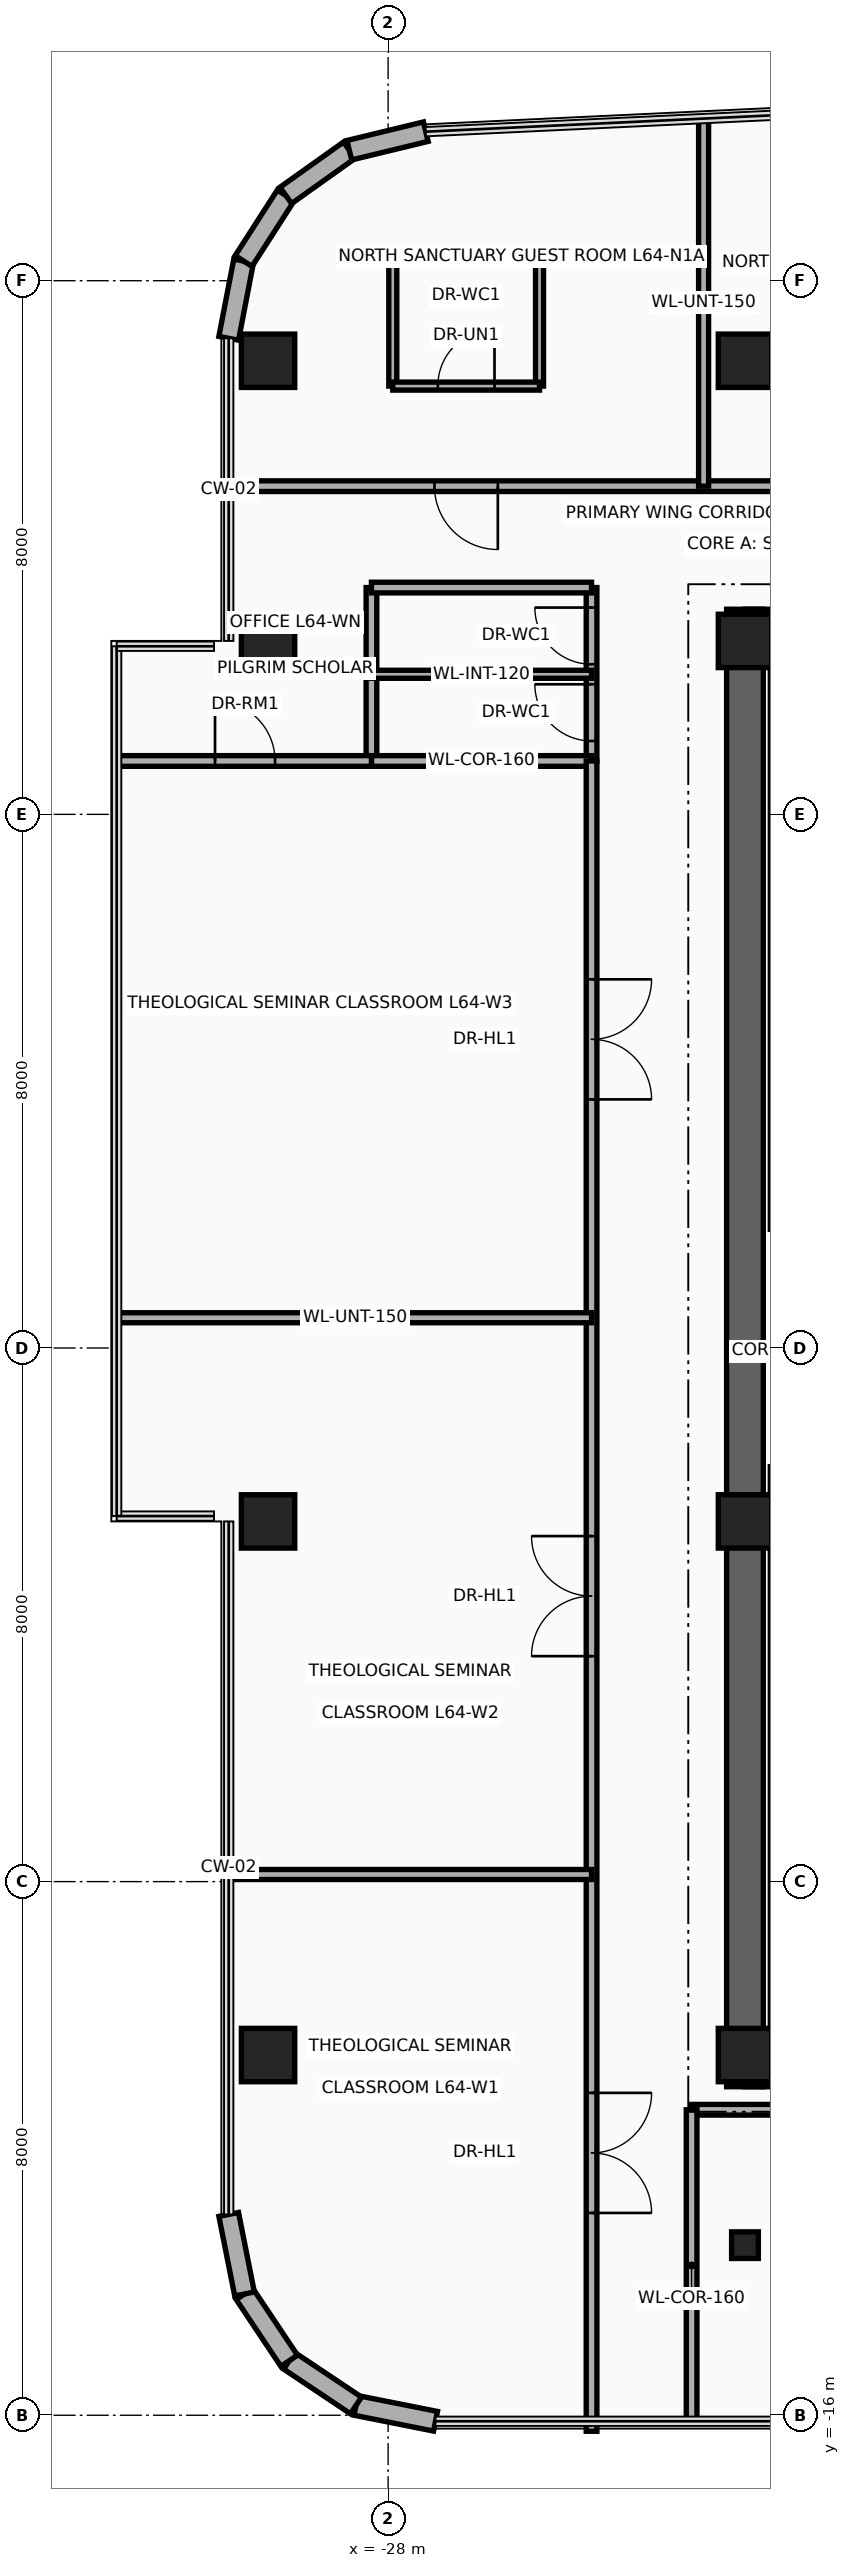
"""IFC4 building model, lengths in metres.
Left out: names, types, materials, properties, quantities, classifications, styles, units other than length and angle.
Written with IfcOpenShell. Run it as: python <this file> out.ifc"""

import sys

from ifc_helpers import new_model, si_unit, direction, frame, frame_2d, origin, origin_2d, place, context, subcontext, project, spatial, rectangle, i_section, extrude, source, transform, mapped, element, fill, save


model = new_model("IFC4")
c1 = context("Model", 3, precision=1e-05, world=origin(), true_north=direction((0.0, 1.0)))
c2 = subcontext(c1, "Body", "Model", "MODEL_VIEW")
j1 = project(units=[si_unit("LENGTHUNIT", "METRE"), si_unit("PLANEANGLEUNIT", "RADIAN")], contexts=[c1])
p1 = place(None, origin())
s1 = spatial("IfcSite", under=j1, at=p1, CompositionType="ELEMENT")
p2 = place(p1, origin())
s2 = spatial("IfcBuilding", under=s1, at=p2, CompositionType="ELEMENT")
p3 = place(p2, frame((0.0, 0.0, 247.5)))
s3 = spatial("IfcBuildingStorey", under=s2, at=p3, CompositionType="ELEMENT", Elevation=247.5)
p4 = place(p3, frame((-22.65, -11.075, 0.0), z_axis=(0.0, 0.0, 1.0), x_axis=(0.0, 1.0, 0.0)))
e1 = element("IfcWall", 1, at=p4, inside=s3, PredefinedType="SHEAR", context=c2, shape_type="SweptSolid", body=[
    extrude(rectangle(XDim=22.15, YDim=0.55, at=frame_2d((11.075, 0.0))), origin(), (0.0, 0.0, 1.0), 3.26),
])
for number, where, z_axis, x_axis in (
    (2, (-22.65, 10.8, 0.0), (0.0, 0.0, 1.0), (1.0, 0.0, 0.0)),
    (3, (-22.65, -10.8, 0.0), (0.0, 0.0, 1.0), (1.0, 0.0, 0.0)),
):
    element("IfcWall", number, at=place(p3, frame(where, z_axis=z_axis, x_axis=x_axis)), inside=s3, PredefinedType="SHEAR", context=c2, shape_type="SweptSolid", body=[
        extrude(rectangle(XDim=10.25, YDim=0.55, at=frame_2d((5.125, 0.0))), origin(), (0.0, 0.0, 1.0), 3.26),
    ])
m1 = source(origin(), c2, "Body", "SweptSolid", [
    extrude(rectangle(XDim=0.8, YDim=0.8, at=origin_2d()), origin(), (0.0, 0.0, 1.0), 3.5),
])
for number, where, z_axis, x_axis in (
    (4, (-29.8, -10.6, 0.0), (0.0, 0.0, 1.0), (1.0, 0.0, 0.0)),
    (5, (-22.65, -10.6, 0.0), (0.0, 0.0, 1.0), (1.0, 0.0, 0.0)),
    (6, (-29.8, -2.6, 0.0), (0.0, 0.0, 1.0), (1.0, 0.0, 0.0)),
    (7, (-22.65, -2.6, 0.0), (0.0, 0.0, 1.0), (1.0, 0.0, 0.0)),
    (8, (-29.8, 10.6, 0.0), (0.0, 0.0, 1.0), (1.0, 0.0, 0.0)),
    (9, (-22.65, 10.6, 0.0), (0.0, 0.0, 1.0), (1.0, 0.0, 0.0)),
    (10, (-29.8, 14.8, 0.0), (0.0, 0.0, 1.0), (1.0, 0.0, 0.0)),
    (11, (-22.65, 14.8, 0.0), (0.0, 0.0, 1.0), (1.0, 0.0, 0.0)),
):
    element("IfcColumn", number, at=place(p3, frame(where, z_axis=z_axis, x_axis=x_axis)), inside=s3, PredefinedType="COLUMN", context=c2, shape_type="MappedRepresentation", body=[
        mapped(m1, transform((0.0, 0.0, 0.0), x_axis=(1.0, 0.0, 0.0), y_axis=(0.0, 1.0, 0.0), z_axis=(0.0, 0.0, 1.0), scale=1.0)),
    ])
m2 = source(origin(), c2, "Body", "SweptSolid", [
    extrude(i_section(OverallWidth=0.401, OverallDepth=0.399, WebThickness=0.025, FlangeThickness=0.04, at=origin_2d()), origin(), (0.0, 0.0, 1.0), 3.5),
])
p5 = place(p3, frame((-22.65, -13.45, 0.0), z_axis=(0.0, 0.0, 1.0), x_axis=(1.0, 0.0, 0.0)))
e12 = element("IfcColumn", 12, at=p5, inside=s3, PredefinedType="COLUMN", context=c2, shape_type="MappedRepresentation", body=[
    mapped(m2, transform((0.0, 0.0, 0.0), x_axis=(1.0, 0.0, 0.0), y_axis=(0.0, 1.0, 0.0), z_axis=(0.0, 0.0, 1.0), scale=1.0)),
])
p6 = place(p3, frame((-30.39, 15.137, 0.0), z_axis=(0.0, 0.0, 1.0), x_axis=(0.189307792679, 0.981917796779, 0.0)))
e13 = element("IfcWall", 13, at=p6, inside=s3, PredefinedType="SOLIDWALL", context=c2, shape_type="SweptSolid", body=[
    extrude(rectangle(XDim=1.18, YDim=0.3, at=frame_2d((0.59, 0.0))), origin(), (0.0, 0.0, 1.0), 2.245),
])
p7 = place(p3, frame((-30.167, 16.295, 0.0), z_axis=(0.0, 0.0, 1.0), x_axis=(0.540842020947, 0.841124193195, 0.0)))
e14 = element("IfcWall", 14, at=p7, inside=s3, PredefinedType="SOLIDWALL", context=c2, shape_type="SweptSolid", body=[
    extrude(rectangle(XDim=1.169, YDim=0.3, at=frame_2d((0.584, 0.0))), origin(), (0.0, 0.0, 1.0), 3.26),
])
p8 = place(p3, frame((-29.534, 17.279, 0.0), z_axis=(0.0, 0.0, 1.0), x_axis=(0.81466371606, 0.579933642527, 0.0)))
e15 = element("IfcWall", 15, at=p8, inside=s3, PredefinedType="SOLIDWALL", context=c2, shape_type="SweptSolid", body=[
    extrude(rectangle(XDim=1.169, YDim=0.3, at=frame_2d((0.584, 0.0))), origin(), (0.0, 0.0, 1.0), 3.26),
])
p9 = place(p3, frame((-28.582, 17.957, 0.0), z_axis=(0.0, 0.0, 1.0), x_axis=(0.971929016595, 0.235274279725, 0.0)))
e16 = element("IfcWall", 16, at=p9, inside=s3, PredefinedType="SOLIDWALL", context=c2, shape_type="SweptSolid", body=[
    extrude(rectangle(XDim=1.18, YDim=0.3, at=frame_2d((0.59, 0.0))), origin(), (0.0, 0.0, 1.0), 3.26),
])
p10 = place(p3, frame((-27.289, -16.09, 0.0), z_axis=(0.0, 0.0, 1.0), x_axis=(-0.980765602568, 0.195189223115, 0.0)))
e17 = element("IfcWall", 17, at=p10, inside=s3, PredefinedType="SOLIDWALL", context=c2, shape_type="SweptSolid", body=[
    extrude(rectangle(XDim=1.216, YDim=0.3, at=frame_2d((0.608, 0.0))), origin(), (0.0, 0.0, 1.0), 3.26),
])
for number, where, z_axis, x_axis in (
    (18, (-28.482, -15.853, 0.0), (0.0, 0.0, 1.0), (-0.831, 0.556, 0.0)),
    (19, (-29.483, -15.183, 0.0), (0.0, 0.0, 1.0), (-0.556, 0.831, 0.0)),
):
    element("IfcWall", number, at=place(p3, frame(where, z_axis=z_axis, x_axis=x_axis)), inside=s3, PredefinedType="SOLIDWALL", context=c2, shape_type="SweptSolid", body=[
        extrude(rectangle(XDim=1.205, YDim=0.3, at=frame_2d((0.603, 0.0))), origin(), (0.0, 0.0, 1.0), 3.26),
    ])
p11 = place(p3, frame((-30.153, -14.182, 0.0), z_axis=(0.0, 0.0, 1.0), x_axis=(-0.194996050505, 0.980804027463, 0.0)))
e20 = element("IfcWall", 20, at=p11, inside=s3, PredefinedType="SOLIDWALL", context=c2, shape_type="SweptSolid", body=[
    extrude(rectangle(XDim=1.216, YDim=0.3, at=frame_2d((0.608, 0.0))), origin(), (0.0, 0.0, 1.0), 3.26),
])
p12 = place(p3, frame((-28.25, 8.8, 0.0), z_axis=(0.0, 0.0, 1.0), x_axis=(0.0, 1.0, 0.0)))
e21 = element("IfcWall", 21, at=p12, inside=s3, PredefinedType="PARTITIONING", context=c2, shape_type="SweptSolid", body=[
    extrude(rectangle(XDim=2.6, YDim=0.16, at=frame_2d((1.3, 0.0))), origin(), (0.0, 0.0, 1.0), 2.544),
])
p13 = place(p3, frame((-24.95, 8.8, 0.0), z_axis=(0.0, 0.0, 1.0), x_axis=(0.0, 1.0, 0.0)))
e22 = element("IfcWall", 22, at=p13, inside=s3, PredefinedType="PARTITIONING", context=c2, shape_type="SweptSolid", body=[
    extrude(rectangle(XDim=2.6, YDim=0.16, at=frame_2d((1.3, 0.0))), origin(), (0.0, 0.0, 1.0), 2.544),
])
p14 = place(p13, frame((0.3, 0.0, 0.0)))
e23 = element("IfcOpeningElement", 23, at=p14, cuts=e22, PredefinedType="OPENING", context=c2, shape_type="SweptSolid", body=[
    extrude(rectangle(XDim=0.85, YDim=2.1, at=frame_2d((0.425, 1.05))), frame((0.0, 0.095, 0.0), z_axis=(0.0, -1.0, 0.0), x_axis=(1.0, 0.0, 0.0)), (0.0, 0.0, 1.0), 0.19),
])
p15 = place(p13, frame((1.45, 0.0, 0.0)))
e24 = element("IfcOpeningElement", 24, at=p15, cuts=e22, PredefinedType="OPENING", context=c2, shape_type="SweptSolid", body=[
    extrude(rectangle(XDim=0.85, YDim=2.1, at=frame_2d((0.425, 1.05))), frame((0.0, 0.095, 0.0), z_axis=(0.0, -1.0, 0.0), x_axis=(1.0, 0.0, 0.0)), (0.0, 0.0, 1.0), 0.19),
])
for number, where, z_axis, x_axis in (
    (25, (-28.25, 8.8, 0.0), (0.0, 0.0, 1.0), (1.0, 0.0, 0.0)),
    (26, (-28.25, 11.4, 0.0), (0.0, 0.0, 1.0), (1.0, 0.0, 0.0)),
):
    element("IfcWall", number, at=place(p3, frame(where, z_axis=z_axis, x_axis=x_axis)), inside=s3, PredefinedType="PARTITIONING", context=c2, shape_type="SweptSolid", body=[
        extrude(rectangle(XDim=3.3, YDim=0.16, at=frame_2d((1.65, 0.0))), origin(), (0.0, 0.0, 1.0), 3.26),
    ])
p16 = place(p3, frame((-28.25, 10.1, 0.0), z_axis=(0.0, 0.0, 1.0), x_axis=(1.0, 0.0, 0.0)))
e27 = element("IfcWall", 27, at=p16, inside=s3, PredefinedType="PARTITIONING", context=c2, shape_type="SweptSolid", body=[
    extrude(rectangle(XDim=3.3, YDim=0.12, at=frame_2d((1.65, 0.0))), origin(), (0.0, 0.0, 1.0), 3.26),
])
p17 = place(p3, frame((-23.45, -11.42, 0.0), z_axis=(0.0, 0.0, 1.0), x_axis=(1.0, 0.0, 0.0)))
e28 = element("IfcWall", 28, at=p17, inside=s3, PredefinedType="PARTITIONING", context=c2, shape_type="SweptSolid", body=[
    extrude(rectangle(XDim=13.84, YDim=0.16, at=frame_2d((6.92, 0.0))), origin(), (0.0, 0.0, 1.0), 2.634),
])
p18 = place(p3, frame((-23.45, -16.09, 0.0), z_axis=(0.0, 0.0, 1.0), x_axis=(0.0, 1.0, 0.0)))
e29 = element("IfcWall", 29, at=p18, inside=s3, PredefinedType="PARTITIONING", context=c2, shape_type="SweptSolid", body=[
    extrude(rectangle(XDim=4.67, YDim=0.16, at=frame_2d((2.335, 0.0))), origin(), (0.0, 0.0, 1.0), 3.26),
])
p19 = place(p3, frame((-24.95, -16.24, 0.0), z_axis=(0.0, 0.0, 1.0), x_axis=(0.0, 1.0, 0.0)))
e30 = element("IfcWall", 30, at=p19, inside=s3, PredefinedType="PARTITIONING", context=c2, shape_type="SweptSolid", body=[
    extrude(rectangle(XDim=25.04, YDim=0.16, at=frame_2d((12.52, 0.0))), origin(), (0.0, 0.0, 1.0), 2.544),
])
p20 = place(p19, frame((3.273, 0.0, 0.0)))
e31 = element("IfcOpeningElement", 31, at=p20, cuts=e30, PredefinedType="OPENING", context=c2, shape_type="SweptSolid", body=[
    extrude(rectangle(XDim=1.8, YDim=2.15, at=frame_2d((0.9, 1.075))), frame((0.0, 0.095, 0.0), z_axis=(0.0, -1.0, 0.0), x_axis=(1.0, 0.0, 0.0)), (0.0, 0.0, 1.0), 0.19),
])
p21 = place(p19, frame((11.62, 0.0, 0.0)))
e32 = element("IfcOpeningElement", 32, at=p21, cuts=e30, PredefinedType="OPENING", context=c2, shape_type="SweptSolid", body=[
    extrude(rectangle(XDim=1.8, YDim=2.15, at=frame_2d((0.9, 1.075))), frame((0.0, 0.095, 0.0), z_axis=(0.0, -1.0, 0.0), x_axis=(1.0, 0.0, 0.0)), (0.0, 0.0, 1.0), 0.19),
])
p22 = place(p19, frame((19.967, 0.0, 0.0)))
e33 = element("IfcOpeningElement", 33, at=p22, cuts=e30, PredefinedType="OPENING", context=c2, shape_type="SweptSolid", body=[
    extrude(rectangle(XDim=1.8, YDim=2.15, at=frame_2d((0.9, 1.075))), frame((0.0, 0.095, 0.0), z_axis=(0.0, -1.0, 0.0), x_axis=(1.0, 0.0, 0.0)), (0.0, 0.0, 1.0), 0.19),
])
p23 = place(p3, frame((-32.04, 8.8, 0.0), z_axis=(0.0, 0.0, 1.0), x_axis=(1.0, 0.0, 0.0)))
e34 = element("IfcWall", 34, at=p23, inside=s3, PredefinedType="PARTITIONING", context=c2, shape_type="SweptSolid", body=[
    extrude(rectangle(XDim=3.79, YDim=0.16, at=frame_2d((1.895, 0.0))), origin(), (0.0, 0.0, 1.0), 2.706),
])
p24 = place(p23, frame((1.445, 0.0, 0.0)))
e35 = element("IfcOpeningElement", 35, at=p24, cuts=e34, PredefinedType="OPENING", context=c2, shape_type="SweptSolid", body=[
    extrude(rectangle(XDim=0.9, YDim=2.1, at=frame_2d((0.45, 1.05))), frame((0.0, 0.095, 0.0), z_axis=(0.0, -1.0, 0.0), x_axis=(1.0, 0.0, 0.0)), (0.0, 0.0, 1.0), 0.19),
])
p25 = place(p3, frame((-30.39, -7.893, 0.0), z_axis=(0.0, 0.0, 1.0), x_axis=(1.0, 0.0, 0.0)))
e36 = element("IfcWall", 36, at=p25, inside=s3, PredefinedType="PARTITIONING", context=c2, shape_type="SweptSolid", body=[
    extrude(rectangle(XDim=5.44, YDim=0.15, at=frame_2d((2.72, 0.0))), origin(), (0.0, 0.0, 1.0), 2.706),
])
p26 = place(p3, frame((-32.04, 0.453, 0.0), z_axis=(0.0, 0.0, 1.0), x_axis=(1.0, 0.0, 0.0)))
e37 = element("IfcWall", 37, at=p26, inside=s3, PredefinedType="PARTITIONING", context=c2, shape_type="SweptSolid", body=[
    extrude(rectangle(XDim=7.09, YDim=0.15, at=frame_2d((3.545, 0.0))), origin(), (0.0, 0.0, 1.0), 2.706),
])
p27 = place(p3, frame((-30.39, 12.92, 0.0), z_axis=(0.0, 0.0, 1.0), x_axis=(1.0, 0.0, 0.0)))
e38 = element("IfcWall", 38, at=p27, inside=s3, PredefinedType="PARTITIONING", context=c2, shape_type="SweptSolid", body=[
    extrude(rectangle(XDim=29.48, YDim=0.16, at=frame_2d((14.74, 0.0))), origin(), (0.0, 0.0, 1.0), 2.634),
])
p28 = place(p27, frame((3.085, 0.0, 0.0)))
e39 = element("IfcOpeningElement", 39, at=p28, cuts=e38, PredefinedType="OPENING", context=c2, shape_type="SweptSolid", body=[
    extrude(rectangle(XDim=0.95, YDim=2.15, at=frame_2d((0.475, 1.075))), frame((0.0, 0.095, 0.0), z_axis=(0.0, -1.0, 0.0), x_axis=(1.0, 0.0, 0.0)), (0.0, 0.0, 1.0), 0.19),
])
p29 = place(p27, frame((9.105, 0.0, 0.0)))
e40 = element("IfcOpeningElement", 40, at=p29, cuts=e38, PredefinedType="OPENING", context=c2, shape_type="SweptSolid", body=[
    extrude(rectangle(XDim=0.95, YDim=2.15, at=frame_2d((0.475, 1.075))), frame((0.0, 0.095, 0.0), z_axis=(0.0, -1.0, 0.0), x_axis=(1.0, 0.0, 0.0)), (0.0, 0.0, 1.0), 0.19),
])
p30 = place(p27, frame((17.27, 0.0, 0.0)))
e41 = element("IfcOpeningElement", 41, at=p30, cuts=e38, PredefinedType="OPENING", context=c2, shape_type="SweptSolid", body=[
    extrude(rectangle(XDim=0.95, YDim=2.15, at=frame_2d((0.475, 1.075))), frame((0.0, 0.095, 0.0), z_axis=(0.0, -1.0, 0.0), x_axis=(1.0, 0.0, 0.0)), (0.0, 0.0, 1.0), 0.19),
])
p31 = place(p3, frame((-23.27, 12.92, 0.0), z_axis=(0.0, 0.0, 1.0), x_axis=(0.0, 1.0, 0.0)))
e42 = element("IfcWall", 42, at=p31, inside=s3, PredefinedType="PARTITIONING", context=c2, shape_type="SweptSolid", body=[
    extrude(rectangle(XDim=5.511, YDim=0.15, at=frame_2d((2.755, 0.0))), origin(), (0.0, 0.0, 1.0), 2.544),
])
for number, where, z_axis, x_axis in (
    (43, (-27.93, 14.42, 0.0), (0.0, 0.0, 1.0), (0.0, 1.0, 0.0)),
    (44, (-25.73, 14.42, 0.0), (0.0, 0.0, 1.0), (0.0, 1.0, 0.0)),
):
    element("IfcWall", number, at=place(p3, frame(where, z_axis=z_axis, x_axis=x_axis)), inside=s3, PredefinedType="PARTITIONING", context=c2, shape_type="SweptSolid", body=[
        extrude(rectangle(XDim=1.984, YDim=0.12, at=frame_2d((0.992, 0.0))), origin(), (0.0, 0.0, 1.0), 2.544),
    ])
p32 = place(p3, frame((-27.93, 16.404, 0.0), z_axis=(0.0, 0.0, 1.0), x_axis=(1.0, 0.0, 0.0)))
e45 = element("IfcWall", 45, at=p32, inside=s3, PredefinedType="PARTITIONING", context=c2, shape_type="SweptSolid", body=[
    extrude(rectangle(XDim=2.2, YDim=0.12, at=frame_2d((1.1, 0.0))), origin(), (0.0, 0.0, 1.0), 3.26),
])
p33 = place(p3, frame((-27.93, 14.42, 0.0), z_axis=(0.0, 0.0, 1.0), x_axis=(1.0, 0.0, 0.0)))
e46 = element("IfcWall", 46, at=p33, inside=s3, PredefinedType="PARTITIONING", context=c2, shape_type="SweptSolid", body=[
    extrude(rectangle(XDim=2.2, YDim=0.12, at=frame_2d((1.1, 0.0))), origin(), (0.0, 0.0, 1.0), 3.26),
])
p34 = place(p33, frame((0.675, 0.0, 0.0)))
e47 = element("IfcOpeningElement", 47, at=p34, cuts=e46, PredefinedType="OPENING", context=c2, shape_type="SweptSolid", body=[
    extrude(rectangle(XDim=0.85, YDim=2.1, at=frame_2d((0.425, 1.05))), frame((0.0, 0.075, 0.0), z_axis=(0.0, -1.0, 0.0), x_axis=(1.0, 0.0, 0.0)), (0.0, 0.0, 1.0), 0.15),
])
p35 = place(p14, origin())
e48 = element("IfcDoor", 48, at=p35, inside=s3, OperationType="SINGLE_SWING_RIGHT", PredefinedType="DOOR", context=c2, shape_type="SweptSolid", body=[
    extrude(rectangle(XDim=0.85, YDim=2.1, at=frame_2d((0.425, 1.05))), frame((0.0, 0.025, 0.0), z_axis=(0.0, -1.0, 0.0), x_axis=(1.0, 0.0, 0.0)), (0.0, 0.0, 1.0), 0.05),
])
fill(e23, e48)
p36 = place(p15, origin())
e49 = element("IfcDoor", 49, at=p36, inside=s3, OperationType="SINGLE_SWING_LEFT", PredefinedType="DOOR", context=c2, shape_type="SweptSolid", body=[
    extrude(rectangle(XDim=0.85, YDim=2.1, at=frame_2d((0.425, 1.05))), frame((0.0, 0.025, 0.0), z_axis=(0.0, -1.0, 0.0), x_axis=(1.0, 0.0, 0.0)), (0.0, 0.0, 1.0), 0.05),
])
fill(e24, e49)
p37 = place(p24, origin())
e50 = element("IfcDoor", 50, at=p37, inside=s3, OperationType="SINGLE_SWING_RIGHT", PredefinedType="DOOR", context=c2, shape_type="SweptSolid", body=[
    extrude(rectangle(XDim=0.9, YDim=2.1, at=frame_2d((0.45, 1.05))), frame((0.0, 0.025, 0.0), z_axis=(0.0, -1.0, 0.0), x_axis=(1.0, 0.0, 0.0)), (0.0, 0.0, 1.0), 0.05),
])
fill(e35, e50)
p38 = place(p20, frame((1.8, 0.0, 0.0), z_axis=(0.0, 0.0, 1.0), x_axis=(-1.0, 0.0, 0.0)))
e51 = element("IfcDoor", 51, at=p38, inside=s3, OperationType="DOUBLE_DOOR_SINGLE_SWING", PredefinedType="DOOR", context=c2, shape_type="SweptSolid", body=[
    extrude(rectangle(XDim=1.8, YDim=2.15, at=frame_2d((0.9, 1.075))), frame((0.0, 0.025, 0.0), z_axis=(0.0, -1.0, 0.0), x_axis=(1.0, 0.0, 0.0)), (0.0, 0.0, 1.0), 0.05),
])
fill(e31, e51)
p39 = place(p21, origin())
e52 = element("IfcDoor", 52, at=p39, inside=s3, OperationType="DOUBLE_DOOR_SINGLE_SWING", PredefinedType="DOOR", context=c2, shape_type="SweptSolid", body=[
    extrude(rectangle(XDim=1.8, YDim=2.15, at=frame_2d((0.9, 1.075))), frame((0.0, 0.025, 0.0), z_axis=(0.0, -1.0, 0.0), x_axis=(1.0, 0.0, 0.0)), (0.0, 0.0, 1.0), 0.05),
])
fill(e32, e52)
p40 = place(p22, frame((1.8, 0.0, 0.0), z_axis=(0.0, 0.0, 1.0), x_axis=(-1.0, 0.0, 0.0)))
e53 = element("IfcDoor", 53, at=p40, inside=s3, OperationType="DOUBLE_DOOR_SINGLE_SWING", PredefinedType="DOOR", context=c2, shape_type="SweptSolid", body=[
    extrude(rectangle(XDim=1.8, YDim=2.15, at=frame_2d((0.9, 1.075))), frame((0.0, 0.025, 0.0), z_axis=(0.0, -1.0, 0.0), x_axis=(1.0, 0.0, 0.0)), (0.0, 0.0, 1.0), 0.05),
])
fill(e33, e53)
p41 = place(p28, frame((0.95, 0.0, 0.0), z_axis=(0.0, 0.0, 1.0), x_axis=(-1.0, 0.0, 0.0)))
e54 = element("IfcDoor", 54, at=p41, inside=s3, OperationType="SINGLE_SWING_LEFT", PredefinedType="DOOR", context=c2, shape_type="SweptSolid", body=[
    extrude(rectangle(XDim=0.95, YDim=2.15, at=frame_2d((0.475, 1.075))), frame((0.0, 0.025, 0.0), z_axis=(0.0, -1.0, 0.0), x_axis=(1.0, 0.0, 0.0)), (0.0, 0.0, 1.0), 0.05),
])
fill(e39, e54)
p42 = place(p34, origin())
e55 = element("IfcDoor", 55, at=p42, inside=s3, OperationType="SINGLE_SWING_RIGHT", PredefinedType="DOOR", context=c2, shape_type="SweptSolid", body=[
    extrude(rectangle(XDim=0.85, YDim=2.1, at=frame_2d((0.425, 1.05))), frame((0.0, 0.025, 0.0), z_axis=(0.0, -1.0, 0.0), x_axis=(1.0, 0.0, 0.0)), (0.0, 0.0, 1.0), 0.05),
])
fill(e47, e55)
save(model, sys.argv[1])
